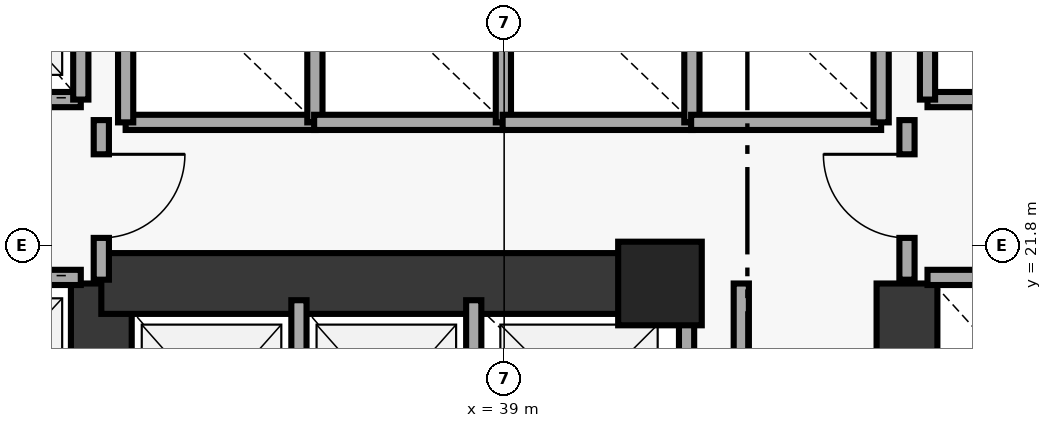
"""IFC4 building model, lengths in metres.
Left out: names, types, materials, properties, quantities, classifications, styles, units other than length and angle.
Written with IfcOpenShell. Run it as: python <this file> out.ifc"""

import sys

from ifc_helpers import new_model, si_unit, direction, frame, frame_2d, origin, origin_2d, place, context, subcontext, project, spatial, rectangle, extrude, element, fill, save


model = new_model("IFC4")
c1 = context("Model", 3, precision=1e-05, world=origin(), true_north=direction((0.0, 1.0)))
c2 = subcontext(c1, "Body", "Model", "MODEL_VIEW")
j1 = project(units=[si_unit("LENGTHUNIT", "METRE"), si_unit("PLANEANGLEUNIT", "RADIAN")], contexts=[c1])
p1 = place(None, origin())
s1 = spatial("IfcSite", under=j1, at=p1, CompositionType="ELEMENT")
p2 = place(p1, origin())
s2 = spatial("IfcBuilding", under=s1, at=p2, CompositionType="ELEMENT")
p3 = place(p2, frame((0.0, 0.0, 53.4)))
s3 = spatial("IfcBuildingStorey", under=s2, at=p3, CompositionType="ELEMENT", Elevation=53.4)
p4 = place(p3, frame((41.05, 21.3, 0.0), z_axis=(0.0, 0.0, 1.0), x_axis=(1.0, 0.0, 0.0)))
e1 = element("IfcColumn", 1, at=p4, inside=s3, PredefinedType="PILASTER", context=c2, shape_type="SweptSolid", body=[
    extrude(rectangle(XDim=1.1, YDim=1.1, at=origin_2d()), origin(), (0.0, 0.0, 1.0), 3.8),
])
for number, where, z_axis, x_axis in (
    (2, (33.7, 18.35, 0.0), (0.0, 0.0, 1.0), (0.0, 1.0, 0.0)),
    (3, (44.3, 18.35, 0.0), (0.0, 0.0, 1.0), (0.0, 1.0, 0.0)),
):
    element("IfcWall", number, at=place(p3, frame(where, z_axis=z_axis, x_axis=x_axis)), inside=s3, PredefinedType="SHEAR", context=c2, shape_type="SweptSolid", body=[
        extrude(rectangle(XDim=2.95, YDim=0.8, at=frame_2d((1.475, 0.0))), origin(), (0.0, 0.0, 1.0), 3.8),
    ])
p5 = place(p3, frame((33.7, 21.3, 0.0), z_axis=(0.0, 0.0, 1.0), x_axis=(1.0, 0.0, 0.0)))
e4 = element("IfcWall", 4, at=p5, inside=s3, PredefinedType="SHEAR", context=c2, shape_type="SweptSolid", body=[
    extrude(rectangle(XDim=7.55, YDim=0.8, at=frame_2d((3.775, 0.0))), origin(), (0.0, 0.0, 1.0), 3.8),
])
p6 = place(p3, frame((31.32, 23.72, 0.0), z_axis=(0.0, 0.0, 1.0), x_axis=(1.0, 0.0, 0.0)))
e5 = element("IfcWall", 5, at=p6, inside=s3, PredefinedType="SOLIDWALL", context=c2, shape_type="SweptSolid", body=[
    extrude(rectangle(XDim=2.11, YDim=0.2, at=frame_2d((1.055, 0.0))), origin(), (0.0, 0.0, 1.0), 3.8),
])
p7 = place(p6, frame((0.505, 0.0, 0.0)))
e6 = element("IfcOpeningElement", 6, at=p7, cuts=e5, PredefinedType="OPENING", context=c2, shape_type="SweptSolid", body=[
    extrude(rectangle(XDim=1.1, YDim=2.15, at=frame_2d((0.55, 1.075))), frame((0.0, 0.11, 0.0), z_axis=(0.0, -1.0, 0.0), x_axis=(1.0, 0.0, 0.0)), (0.0, 0.0, 1.0), 0.22),
])
p8 = place(p3, frame((33.43, 23.72, 0.0), z_axis=(0.0, 0.0, 1.0), x_axis=(0.0, 1.0, 0.0)))
e7 = element("IfcWall", 7, at=p8, inside=s3, PredefinedType="SOLIDWALL", context=c2, shape_type="SweptSolid", body=[
    extrude(rectangle(XDim=2.41, YDim=0.2, at=frame_2d((1.205, 0.0))), origin(), (0.0, 0.0, 1.0), 3.8),
])
p9 = place(p3, frame((31.32, 21.38, 0.0), z_axis=(0.0, 0.0, 1.0), x_axis=(1.0, 0.0, 0.0)))
e8 = element("IfcWall", 8, at=p9, inside=s3, PredefinedType="SOLIDWALL", context=c2, shape_type="SweptSolid", body=[
    extrude(rectangle(XDim=2.11, YDim=0.2, at=frame_2d((1.055, 0.0))), origin(), (0.0, 0.0, 1.0), 3.8),
])
p10 = place(p9, frame((0.505, 0.0, 0.0)))
e9 = element("IfcOpeningElement", 9, at=p10, cuts=e8, PredefinedType="OPENING", context=c2, shape_type="SweptSolid", body=[
    extrude(rectangle(XDim=1.1, YDim=2.15, at=frame_2d((0.55, 1.075))), frame((0.0, 0.11, 0.0), z_axis=(0.0, -1.0, 0.0), x_axis=(1.0, 0.0, 0.0)), (0.0, 0.0, 1.0), 0.22),
])
p11 = place(p3, frame((44.57, 23.72, 0.0), z_axis=(0.0, 0.0, 1.0), x_axis=(1.0, 0.0, 0.0)))
e10 = element("IfcWall", 10, at=p11, inside=s3, PredefinedType="SOLIDWALL", context=c2, shape_type="SweptSolid", body=[
    extrude(rectangle(XDim=2.11, YDim=0.2, at=frame_2d((1.055, 0.0))), origin(), (0.0, 0.0, 1.0), 3.8),
])
p12 = place(p3, frame((44.57, 23.72, 0.0), z_axis=(0.0, 0.0, 1.0), x_axis=(0.0, 1.0, 0.0)))
e11 = element("IfcWall", 11, at=p12, inside=s3, PredefinedType="SOLIDWALL", context=c2, shape_type="SweptSolid", body=[
    extrude(rectangle(XDim=2.41, YDim=0.2, at=frame_2d((1.205, 0.0))), origin(), (0.0, 0.0, 1.0), 3.8),
])
p13 = place(p3, frame((44.57, 21.38, 0.0), z_axis=(0.0, 0.0, 1.0), x_axis=(1.0, 0.0, 0.0)))
e12 = element("IfcWall", 12, at=p13, inside=s3, PredefinedType="SOLIDWALL", context=c2, shape_type="SweptSolid", body=[
    extrude(rectangle(XDim=2.11, YDim=0.2, at=frame_2d((1.055, 0.0))), origin(), (0.0, 0.0, 1.0), 3.8),
])
p14 = place(p3, frame((34.02, 23.42, 0.0), z_axis=(0.0, 0.0, 1.0), x_axis=(1.0, 0.0, 0.0)))
e13 = element("IfcWall", 13, at=p14, inside=s3, PredefinedType="SOLIDWALL", context=c2, shape_type="SweptSolid", body=[
    extrude(rectangle(XDim=2.5, YDim=0.2, at=frame_2d((1.25, 0.0))), origin(), (0.0, 0.0, 1.0), 3.8),
])
for number, where, z_axis, x_axis in (
    (14, (34.02, 23.42, 0.0), (0.0, 0.0, 1.0), (0.0, 1.0, 0.0)),
    (15, (36.51, 23.42, 0.0), (0.0, 0.0, 1.0), (0.0, 1.0, 0.0)),
):
    element("IfcWall", number, at=place(p3, frame(where, z_axis=z_axis, x_axis=x_axis)), inside=s3, PredefinedType="SOLIDWALL", context=c2, shape_type="SweptSolid", body=[
        extrude(rectangle(XDim=2.41, YDim=0.2, at=frame_2d((1.205, 0.0))), origin(), (0.0, 0.0, 1.0), 3.8),
    ])
p15 = place(p3, frame((36.5, 23.42, 0.0), z_axis=(0.0, 0.0, 1.0), x_axis=(1.0, 0.0, 0.0)))
e16 = element("IfcWall", 16, at=p15, inside=s3, PredefinedType="SOLIDWALL", context=c2, shape_type="SweptSolid", body=[
    extrude(rectangle(XDim=2.5, YDim=0.2, at=frame_2d((1.25, 0.0))), origin(), (0.0, 0.0, 1.0), 3.8),
])
p16 = place(p3, frame((38.99, 23.42, 0.0), z_axis=(0.0, 0.0, 1.0), x_axis=(0.0, 1.0, 0.0)))
e17 = element("IfcWall", 17, at=p16, inside=s3, PredefinedType="SOLIDWALL", context=c2, shape_type="SweptSolid", body=[
    extrude(rectangle(XDim=2.41, YDim=0.2, at=frame_2d((1.205, 0.0))), origin(), (0.0, 0.0, 1.0), 3.8),
])
p17 = place(p3, frame((38.98, 23.42, 0.0), z_axis=(0.0, 0.0, 1.0), x_axis=(1.0, 0.0, 0.0)))
e18 = element("IfcWall", 18, at=p17, inside=s3, PredefinedType="SOLIDWALL", context=c2, shape_type="SweptSolid", body=[
    extrude(rectangle(XDim=2.5, YDim=0.2, at=frame_2d((1.25, 0.0))), origin(), (0.0, 0.0, 1.0), 3.8),
])
p18 = place(p3, frame((41.47, 23.42, 0.0), z_axis=(0.0, 0.0, 1.0), x_axis=(0.0, 1.0, 0.0)))
e19 = element("IfcWall", 19, at=p18, inside=s3, PredefinedType="SOLIDWALL", context=c2, shape_type="SweptSolid", body=[
    extrude(rectangle(XDim=2.41, YDim=0.2, at=frame_2d((1.205, 0.0))), origin(), (0.0, 0.0, 1.0), 3.8),
])
p19 = place(p3, frame((41.46, 23.42, 0.0), z_axis=(0.0, 0.0, 1.0), x_axis=(1.0, 0.0, 0.0)))
e20 = element("IfcWall", 20, at=p19, inside=s3, PredefinedType="SOLIDWALL", context=c2, shape_type="SweptSolid", body=[
    extrude(rectangle(XDim=2.5, YDim=0.2, at=frame_2d((1.25, 0.0))), origin(), (0.0, 0.0, 1.0), 3.8),
])
p20 = place(p3, frame((43.96, 23.42, 0.0), z_axis=(0.0, 0.0, 1.0), x_axis=(0.0, 1.0, 0.0)))
e21 = element("IfcWall", 21, at=p20, inside=s3, PredefinedType="SOLIDWALL", context=c2, shape_type="SweptSolid", body=[
    extrude(rectangle(XDim=2.41, YDim=0.2, at=frame_2d((1.205, 0.0))), origin(), (0.0, 0.0, 1.0), 3.8),
])
for number, where, z_axis, x_axis in (
    (22, (36.3, 18.37, 0.0), (0.0, 0.0, 1.0), (0.0, 1.0, 0.0)),
    (23, (38.6, 18.37, 0.0), (0.0, 0.0, 1.0), (0.0, 1.0, 0.0)),
    (24, (41.4, 18.37, 0.0), (0.0, 0.0, 1.0), (0.0, 1.0, 0.0)),
):
    element("IfcWall", number, at=place(p3, frame(where, z_axis=z_axis, x_axis=x_axis)), inside=s3, PredefinedType="SOLIDWALL", context=c2, shape_type="SweptSolid", body=[
        extrude(rectangle(XDim=2.71, YDim=0.2, at=frame_2d((1.355, 0.0))), origin(), (0.0, 0.0, 1.0), 3.8),
    ])
p21 = place(p3, frame((33.7, 21.35, 0.0), z_axis=(0.0, 0.0, 1.0), x_axis=(0.0, 1.0, 0.0)))
e25 = element("IfcWall", 25, at=p21, inside=s3, PredefinedType="SOLIDWALL", context=c2, shape_type="SweptSolid", body=[
    extrude(rectangle(XDim=2.1, YDim=0.2, at=frame_2d((1.05, 0.0))), origin(), (0.0, 0.0, 1.0), 3.02),
])
p22 = place(p21, frame((0.55, 0.0, 0.0)))
e26 = element("IfcOpeningElement", 26, at=p22, cuts=e25, PredefinedType="OPENING", context=c2, shape_type="SweptSolid", body=[
    extrude(rectangle(XDim=1.1, YDim=2.15, at=frame_2d((0.55, 1.075))), frame((0.0, 0.11, 0.0), z_axis=(0.0, -1.0, 0.0), x_axis=(1.0, 0.0, 0.0)), (0.0, 0.0, 1.0), 0.22),
])
p23 = place(p3, frame((44.3, 21.35, 0.0), z_axis=(0.0, 0.0, 1.0), x_axis=(0.0, 1.0, 0.0)))
e27 = element("IfcWall", 27, at=p23, inside=s3, PredefinedType="SOLIDWALL", context=c2, shape_type="SweptSolid", body=[
    extrude(rectangle(XDim=2.1, YDim=0.2, at=frame_2d((1.05, 0.0))), origin(), (0.0, 0.0, 1.0), 3.02),
])
p24 = place(p23, frame((0.55, 0.0, 0.0)))
e28 = element("IfcOpeningElement", 28, at=p24, cuts=e27, PredefinedType="OPENING", context=c2, shape_type="SweptSolid", body=[
    extrude(rectangle(XDim=1.1, YDim=2.15, at=frame_2d((0.55, 1.075))), frame((0.0, 0.11, 0.0), z_axis=(0.0, -1.0, 0.0), x_axis=(1.0, 0.0, 0.0)), (0.0, 0.0, 1.0), 0.22),
])
p25 = place(p3, frame((42.12, 18.35, 0.0), z_axis=(0.0, 0.0, 1.0), x_axis=(0.0, 1.0, 0.0)))
e29 = element("IfcWall", 29, at=p25, inside=s3, PredefinedType="SOLIDWALL", context=c2, shape_type="SweptSolid", body=[
    extrude(rectangle(XDim=2.95, YDim=0.2, at=frame_2d((1.475, 0.0))), origin(), (0.0, 0.0, 1.0), 3.8),
])
p26 = place(p25, frame((0.2, 0.0, 0.0)))
e30 = element("IfcOpeningElement", 30, at=p26, cuts=e29, PredefinedType="OPENING", context=c2, shape_type="SweptSolid", body=[
    extrude(rectangle(XDim=0.8, YDim=2.05, at=frame_2d((0.4, 1.025))), frame((0.0, 0.11, 0.0), z_axis=(0.0, -1.0, 0.0), x_axis=(1.0, 0.0, 0.0)), (0.0, 0.0, 1.0), 0.22),
])
p27 = place(p22, origin())
e31 = element("IfcDoor", 31, at=p27, inside=s3, OperationType="SINGLE_SWING_RIGHT", PredefinedType="DOOR", context=c2, shape_type="SweptSolid", body=[
    extrude(rectangle(XDim=1.1, YDim=2.15, at=frame_2d((0.55, 1.075))), frame((0.0, 0.025, 0.0), z_axis=(0.0, -1.0, 0.0), x_axis=(1.0, 0.0, 0.0)), (0.0, 0.0, 1.0), 0.05),
])
fill(e26, e31)
p28 = place(p24, origin())
e32 = element("IfcDoor", 32, at=p28, inside=s3, OperationType="SINGLE_SWING_RIGHT", PredefinedType="DOOR", context=c2, shape_type="SweptSolid", body=[
    extrude(rectangle(XDim=1.1, YDim=2.15, at=frame_2d((0.55, 1.075))), frame((0.0, 0.025, 0.0), z_axis=(0.0, -1.0, 0.0), x_axis=(1.0, 0.0, 0.0)), (0.0, 0.0, 1.0), 0.05),
])
fill(e28, e32)
save(model, sys.argv[1])
